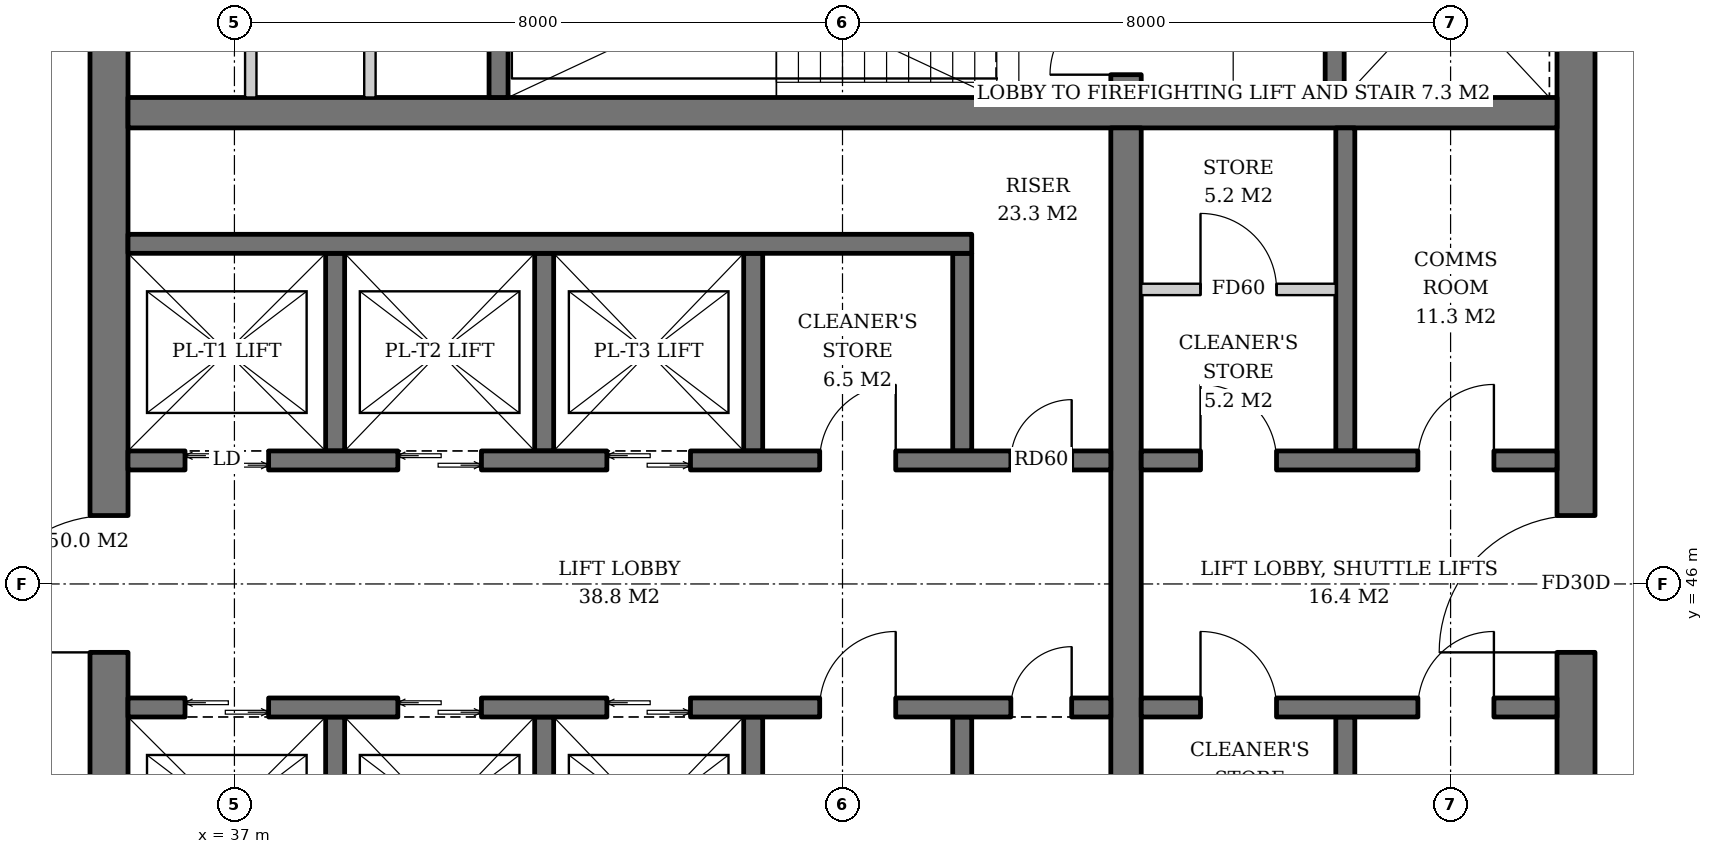
"""IFC4 building model, lengths in metres.
Left out: names, types, materials, properties, quantities, classifications, styles, units other than length and angle.
Written with IfcOpenShell. Run it as: python <this file> out.ifc"""

import sys

from ifc_helpers import new_model, si_unit, direction, frame, frame_2d, origin, place, context, subcontext, project, spatial, rectangle, extrude, element, fill, save


model = new_model("IFC4")
c1 = context("Model", 3, precision=1e-05, world=origin(), true_north=direction((0.0, 1.0)))
c2 = subcontext(c1, "Body", "Model", "MODEL_VIEW")
j1 = project(units=[si_unit("LENGTHUNIT", "METRE"), si_unit("PLANEANGLEUNIT", "RADIAN")], contexts=[c1])
p1 = place(None, origin())
s1 = spatial("IfcSite", under=j1, at=p1, CompositionType="ELEMENT")
p2 = place(p1, origin())
s2 = spatial("IfcBuilding", under=s1, at=p2, CompositionType="ELEMENT")
p3 = place(p2, frame((0.0, 0.0, 279.4)))
s3 = spatial("IfcBuildingStorey", under=s2, at=p3, CompositionType="ELEMENT", Elevation=279.4)
p4 = place(p3, frame((35.35, 36.6, 0.0), z_axis=(0.0, 0.0, 1.0), x_axis=(0.0, 1.0, 0.0)))
e1 = element("IfcWall", 1, at=p4, inside=s3, PredefinedType="SHEAR", context=c2, shape_type="SweptSolid", body=[
    extrude(rectangle(XDim=18.8, YDim=0.5, at=frame_2d((9.4, 0.0))), origin(), (0.0, 0.0, 1.0), 3.8),
])
p5 = place(p4, frame((8.5, 0.0, 0.0)))
e2 = element("IfcOpeningElement", 2, at=p5, cuts=e1, PredefinedType="OPENING", context=c2, shape_type="SweptSolid", body=[
    extrude(rectangle(XDim=1.8, YDim=2.4, at=frame_2d((0.9, 1.2))), frame((0.0, 0.26, 0.0), z_axis=(0.0, -1.0, 0.0), x_axis=(1.0, 0.0, 0.0)), (0.0, 0.0, 1.0), 0.52),
])
p6 = place(p3, frame((54.65, 36.6, 0.0), z_axis=(0.0, 0.0, 1.0), x_axis=(0.0, 1.0, 0.0)))
e3 = element("IfcWall", 3, at=p6, inside=s3, PredefinedType="SHEAR", context=c2, shape_type="SweptSolid", body=[
    extrude(rectangle(XDim=18.8, YDim=0.5, at=frame_2d((9.4, 0.0))), origin(), (0.0, 0.0, 1.0), 3.8),
])
p7 = place(p6, frame((8.5, 0.0, 0.0)))
e4 = element("IfcOpeningElement", 4, at=p7, cuts=e3, PredefinedType="OPENING", context=c2, shape_type="SweptSolid", body=[
    extrude(rectangle(XDim=1.8, YDim=2.4, at=frame_2d((0.9, 1.2))), frame((0.0, 0.26, 0.0), z_axis=(0.0, -1.0, 0.0), x_axis=(1.0, 0.0, 0.0)), (0.0, 0.0, 1.0), 0.52),
])
p8 = place(p3, frame((35.6, 52.2, 0.0), z_axis=(0.0, 0.0, 1.0), x_axis=(1.0, 0.0, 0.0)))
e5 = element("IfcWall", 5, at=p8, inside=s3, PredefinedType="SHEAR", context=c2, shape_type="SweptSolid", body=[
    extrude(rectangle(XDim=18.8, YDim=0.4, at=frame_2d((9.4, 0.0))), origin(), (0.0, 0.0, 1.0), 3.8),
])
p9 = place(p3, frame((48.73, 40.0, 0.0), z_axis=(0.0, 0.0, 1.0), x_axis=(0.0, 1.0, 0.0)))
e6 = element("IfcWall", 6, at=p9, inside=s3, PredefinedType="SHEAR", context=c2, shape_type="SweptSolid", body=[
    extrude(rectangle(XDim=12.0, YDim=0.4, at=frame_2d((6.0, 0.0))), origin(), (0.0, 0.0, 1.0), 3.8),
])
p10 = place(p3, frame((48.73, 52.4, 0.0), z_axis=(0.0, 0.0, 1.0), x_axis=(0.0, 1.0, 0.0)))
e7 = element("IfcWall", 7, at=p10, inside=s3, PredefinedType="SHEAR", context=c2, shape_type="SweptSolid", body=[
    extrude(rectangle(XDim=3.0, YDim=0.4, at=frame_2d((1.5, 0.0))), origin(), (0.0, 0.0, 1.0), 3.8),
])
p11 = place(p10, frame((0.3, 0.0, 0.0)))
e8 = element("IfcOpeningElement", 8, at=p11, cuts=e7, PredefinedType="OPENING", context=c2, shape_type="SweptSolid", body=[
    extrude(rectangle(XDim=1.0, YDim=2.1, at=frame_2d((0.5, 1.05))), frame((0.0, 0.21, 0.0), z_axis=(0.0, -1.0, 0.0), x_axis=(1.0, 0.0, 0.0)), (0.0, 0.0, 1.0), 0.42),
])
p12 = place(p3, frame((40.475, 52.4, 0.0), z_axis=(0.0, 0.0, 1.0), x_axis=(0.0, 1.0, 0.0)))
e9 = element("IfcWall", 9, at=p12, inside=s3, PredefinedType="SHEAR", context=c2, shape_type="SweptSolid", body=[
    extrude(rectangle(XDim=3.0, YDim=0.25, at=frame_2d((1.5, 0.0))), origin(), (0.0, 0.0, 1.0), 3.8),
])
p13 = place(p3, frame((51.475, 52.4, 0.0), z_axis=(0.0, 0.0, 1.0), x_axis=(0.0, 1.0, 0.0)))
e10 = element("IfcWall", 10, at=p13, inside=s3, PredefinedType="SHEAR", context=c2, shape_type="SweptSolid", body=[
    extrude(rectangle(XDim=3.0, YDim=0.25, at=frame_2d((1.5, 0.0))), origin(), (0.0, 0.0, 1.0), 3.8),
])
p14 = place(p13, frame((0.8, 0.0, 0.0)))
e11 = element("IfcOpeningElement", 11, at=p14, cuts=e10, PredefinedType="OPENING", context=c2, shape_type="SweptSolid", body=[
    extrude(rectangle(XDim=1.3, YDim=2.2, at=frame_2d((0.65, 1.1))), frame((0.0, 0.135, 0.0), z_axis=(0.0, -1.0, 0.0), x_axis=(1.0, 0.0, 0.0)), (0.0, 0.0, 1.0), 0.27),
])
for number, where, z_axis, x_axis in (
    (12, (38.325, 47.75, 0.0), (0.0, 0.0, 1.0), (0.0, 1.0, 0.0)),
    (13, (41.075, 47.75, 0.0), (0.0, 0.0, 1.0), (0.0, 1.0, 0.0)),
    (14, (43.825, 47.75, 0.0), (0.0, 0.0, 1.0), (0.0, 1.0, 0.0)),
    (15, (46.575, 47.75, 0.0), (0.0, 0.0, 1.0), (0.0, 1.0, 0.0)),
):
    element("IfcWall", number, at=place(p3, frame(where, z_axis=z_axis, x_axis=x_axis)), inside=s3, PredefinedType="SHEAR", context=c2, shape_type="SweptSolid", body=[
        extrude(rectangle(XDim=2.6, YDim=0.25, at=frame_2d((1.3, 0.0))), origin(), (0.0, 0.0, 1.0), 3.8),
    ])
p15 = place(p3, frame((35.6, 50.475, 0.0), z_axis=(0.0, 0.0, 1.0), x_axis=(1.0, 0.0, 0.0)))
e16 = element("IfcWall", 16, at=p15, inside=s3, PredefinedType="SHEAR", context=c2, shape_type="SweptSolid", body=[
    extrude(rectangle(XDim=11.1, YDim=0.25, at=frame_2d((5.55, 0.0))), origin(), (0.0, 0.0, 1.0), 3.8),
])
p16 = place(p3, frame((35.6, 47.625, 0.0), z_axis=(0.0, 0.0, 1.0), x_axis=(1.0, 0.0, 0.0)))
e17 = element("IfcWall", 17, at=p16, inside=s3, PredefinedType="SHEAR", context=c2, shape_type="SweptSolid", body=[
    extrude(rectangle(XDim=12.93, YDim=0.25, at=frame_2d((6.465, 0.0))), origin(), (0.0, 0.0, 1.0), 3.8),
])
p17 = place(p16, frame((0.75, 0.0, 0.0)))
e18 = element("IfcOpeningElement", 18, at=p17, cuts=e17, PredefinedType="OPENING", context=c2, shape_type="SweptSolid", body=[
    extrude(rectangle(XDim=1.1, YDim=2.2, at=frame_2d((0.55, 1.1))), frame((0.0, 0.135, 0.0), z_axis=(0.0, -1.0, 0.0), x_axis=(1.0, 0.0, 0.0)), (0.0, 0.0, 1.0), 0.27),
])
p18 = place(p16, frame((3.55, 0.0, 0.0)))
e19 = element("IfcOpeningElement", 19, at=p18, cuts=e17, PredefinedType="OPENING", context=c2, shape_type="SweptSolid", body=[
    extrude(rectangle(XDim=1.1, YDim=2.2, at=frame_2d((0.55, 1.1))), frame((0.0, 0.135, 0.0), z_axis=(0.0, -1.0, 0.0), x_axis=(1.0, 0.0, 0.0)), (0.0, 0.0, 1.0), 0.27),
])
p19 = place(p16, frame((6.3, 0.0, 0.0)))
e20 = element("IfcOpeningElement", 20, at=p19, cuts=e17, PredefinedType="OPENING", context=c2, shape_type="SweptSolid", body=[
    extrude(rectangle(XDim=1.1, YDim=2.2, at=frame_2d((0.55, 1.1))), frame((0.0, 0.135, 0.0), z_axis=(0.0, -1.0, 0.0), x_axis=(1.0, 0.0, 0.0)), (0.0, 0.0, 1.0), 0.27),
])
p20 = place(p16, frame((9.1, 0.0, 0.0)))
e21 = element("IfcOpeningElement", 21, at=p20, cuts=e17, PredefinedType="OPENING", context=c2, shape_type="SweptSolid", body=[
    extrude(rectangle(XDim=1.0, YDim=2.1, at=frame_2d((0.5, 1.05))), frame((0.0, 0.135, 0.0), z_axis=(0.0, -1.0, 0.0), x_axis=(1.0, 0.0, 0.0)), (0.0, 0.0, 1.0), 0.27),
])
p21 = place(p16, frame((11.615, 0.0, 0.0)))
e22 = element("IfcOpeningElement", 22, at=p21, cuts=e17, PredefinedType="OPENING", context=c2, shape_type="SweptSolid", body=[
    extrude(rectangle(XDim=0.8, YDim=2.0, at=frame_2d((0.4, 1.0))), frame((0.0, 0.135, 0.0), z_axis=(0.0, -1.0, 0.0), x_axis=(1.0, 0.0, 0.0)), (0.0, 0.0, 1.0), 0.27),
])
for number, where, z_axis, x_axis in (
    (23, (38.325, 44.25, 0.0), (0.0, 0.0, 1.0), (0.0, -1.0, 0.0)),
    (24, (41.075, 44.25, 0.0), (0.0, 0.0, 1.0), (0.0, -1.0, 0.0)),
    (25, (43.825, 44.25, 0.0), (0.0, 0.0, 1.0), (0.0, -1.0, 0.0)),
    (26, (46.575, 44.25, 0.0), (0.0, 0.0, 1.0), (0.0, -1.0, 0.0)),
):
    element("IfcWall", number, at=place(p3, frame(where, z_axis=z_axis, x_axis=x_axis)), inside=s3, PredefinedType="SHEAR", context=c2, shape_type="SweptSolid", body=[
        extrude(rectangle(XDim=2.6, YDim=0.25, at=frame_2d((1.3, 0.0))), origin(), (0.0, 0.0, 1.0), 3.8),
    ])
p22 = place(p3, frame((35.6, 44.375, 0.0), z_axis=(0.0, 0.0, 1.0), x_axis=(1.0, 0.0, 0.0)))
e27 = element("IfcWall", 27, at=p22, inside=s3, PredefinedType="SHEAR", context=c2, shape_type="SweptSolid", body=[
    extrude(rectangle(XDim=12.93, YDim=0.25, at=frame_2d((6.465, 0.0))), origin(), (0.0, 0.0, 1.0), 3.8),
])
p23 = place(p22, frame((0.75, 0.0, 0.0)))
e28 = element("IfcOpeningElement", 28, at=p23, cuts=e27, PredefinedType="OPENING", context=c2, shape_type="SweptSolid", body=[
    extrude(rectangle(XDim=1.1, YDim=2.2, at=frame_2d((0.55, 1.1))), frame((0.0, 0.135, 0.0), z_axis=(0.0, -1.0, 0.0), x_axis=(1.0, 0.0, 0.0)), (0.0, 0.0, 1.0), 0.27),
])
p24 = place(p22, frame((3.55, 0.0, 0.0)))
e29 = element("IfcOpeningElement", 29, at=p24, cuts=e27, PredefinedType="OPENING", context=c2, shape_type="SweptSolid", body=[
    extrude(rectangle(XDim=1.1, YDim=2.2, at=frame_2d((0.55, 1.1))), frame((0.0, 0.135, 0.0), z_axis=(0.0, -1.0, 0.0), x_axis=(1.0, 0.0, 0.0)), (0.0, 0.0, 1.0), 0.27),
])
p25 = place(p22, frame((6.3, 0.0, 0.0)))
e30 = element("IfcOpeningElement", 30, at=p25, cuts=e27, PredefinedType="OPENING", context=c2, shape_type="SweptSolid", body=[
    extrude(rectangle(XDim=1.1, YDim=2.2, at=frame_2d((0.55, 1.1))), frame((0.0, 0.135, 0.0), z_axis=(0.0, -1.0, 0.0), x_axis=(1.0, 0.0, 0.0)), (0.0, 0.0, 1.0), 0.27),
])
p26 = place(p22, frame((9.1, 0.0, 0.0)))
e31 = element("IfcOpeningElement", 31, at=p26, cuts=e27, PredefinedType="OPENING", context=c2, shape_type="SweptSolid", body=[
    extrude(rectangle(XDim=1.0, YDim=2.1, at=frame_2d((0.5, 1.05))), frame((0.0, 0.135, 0.0), z_axis=(0.0, -1.0, 0.0), x_axis=(1.0, 0.0, 0.0)), (0.0, 0.0, 1.0), 0.27),
])
p27 = place(p22, frame((11.615, 0.0, 0.0)))
e32 = element("IfcOpeningElement", 32, at=p27, cuts=e27, PredefinedType="OPENING", context=c2, shape_type="SweptSolid", body=[
    extrude(rectangle(XDim=0.8, YDim=2.0, at=frame_2d((0.4, 1.0))), frame((0.0, 0.135, 0.0), z_axis=(0.0, -1.0, 0.0), x_axis=(1.0, 0.0, 0.0)), (0.0, 0.0, 1.0), 0.27),
])
p28 = place(p3, frame((51.615, 47.75, 0.0), z_axis=(0.0, 0.0, 1.0), x_axis=(0.0, 1.0, 0.0)))
e33 = element("IfcWall", 33, at=p28, inside=s3, PredefinedType="SHEAR", context=c2, shape_type="SweptSolid", body=[
    extrude(rectangle(XDim=4.25, YDim=0.25, at=frame_2d((2.125, 0.0))), origin(), (0.0, 0.0, 1.0), 3.8),
])
p29 = place(p3, frame((48.93, 47.625, 0.0), z_axis=(0.0, 0.0, 1.0), x_axis=(1.0, 0.0, 0.0)))
e34 = element("IfcWall", 34, at=p29, inside=s3, PredefinedType="SHEAR", context=c2, shape_type="SweptSolid", body=[
    extrude(rectangle(XDim=5.47, YDim=0.25, at=frame_2d((2.735, 0.0))), origin(), (0.0, 0.0, 1.0), 3.8),
])
p30 = place(p29, frame((0.78, 0.0, 0.0)))
e35 = element("IfcOpeningElement", 35, at=p30, cuts=e34, PredefinedType="OPENING", context=c2, shape_type="SweptSolid", body=[
    extrude(rectangle(XDim=1.0, YDim=2.1, at=frame_2d((0.5, 1.05))), frame((0.0, 0.135, 0.0), z_axis=(0.0, -1.0, 0.0), x_axis=(1.0, 0.0, 0.0)), (0.0, 0.0, 1.0), 0.27),
])
p31 = place(p29, frame((3.64, 0.0, 0.0)))
e36 = element("IfcOpeningElement", 36, at=p31, cuts=e34, PredefinedType="OPENING", context=c2, shape_type="SweptSolid", body=[
    extrude(rectangle(XDim=1.0, YDim=2.1, at=frame_2d((0.5, 1.05))), frame((0.0, 0.135, 0.0), z_axis=(0.0, -1.0, 0.0), x_axis=(1.0, 0.0, 0.0)), (0.0, 0.0, 1.0), 0.27),
])
p32 = place(p3, frame((51.615, 44.25, 0.0), z_axis=(0.0, 0.0, 1.0), x_axis=(0.0, -1.0, 0.0)))
e37 = element("IfcWall", 37, at=p32, inside=s3, PredefinedType="SHEAR", context=c2, shape_type="SweptSolid", body=[
    extrude(rectangle(XDim=4.25, YDim=0.25, at=frame_2d((2.125, 0.0))), origin(), (0.0, 0.0, 1.0), 3.8),
])
p33 = place(p3, frame((48.93, 44.375, 0.0), z_axis=(0.0, 0.0, 1.0), x_axis=(1.0, 0.0, 0.0)))
e38 = element("IfcWall", 38, at=p33, inside=s3, PredefinedType="SHEAR", context=c2, shape_type="SweptSolid", body=[
    extrude(rectangle(XDim=5.47, YDim=0.25, at=frame_2d((2.735, 0.0))), origin(), (0.0, 0.0, 1.0), 3.8),
])
p34 = place(p33, frame((0.78, 0.0, 0.0)))
e39 = element("IfcOpeningElement", 39, at=p34, cuts=e38, PredefinedType="OPENING", context=c2, shape_type="SweptSolid", body=[
    extrude(rectangle(XDim=1.0, YDim=2.1, at=frame_2d((0.5, 1.05))), frame((0.0, 0.135, 0.0), z_axis=(0.0, -1.0, 0.0), x_axis=(1.0, 0.0, 0.0)), (0.0, 0.0, 1.0), 0.27),
])
p35 = place(p33, frame((3.64, 0.0, 0.0)))
e40 = element("IfcOpeningElement", 40, at=p35, cuts=e38, PredefinedType="OPENING", context=c2, shape_type="SweptSolid", body=[
    extrude(rectangle(XDim=1.0, YDim=2.1, at=frame_2d((0.5, 1.05))), frame((0.0, 0.135, 0.0), z_axis=(0.0, -1.0, 0.0), x_axis=(1.0, 0.0, 0.0)), (0.0, 0.0, 1.0), 0.27),
])
for number, where, z_axis, x_axis in (
    (41, (37.215, 52.4, 0.0), (0.0, 0.0, 1.0), (0.0, 1.0, 0.0)),
    (42, (38.782, 52.4, 0.0), (0.0, 0.0, 1.0), (0.0, 1.0, 0.0)),
):
    element("IfcWall", number, at=place(p3, frame(where, z_axis=z_axis, x_axis=x_axis)), inside=s3, PredefinedType="SOLIDWALL", context=c2, shape_type="SweptSolid", body=[
        extrude(rectangle(XDim=3.0, YDim=0.15, at=frame_2d((1.5, 0.0))), origin(), (0.0, 0.0, 1.0), 3.5),
    ])
p36 = place(p3, frame((48.93, 49.875, 0.0), z_axis=(0.0, 0.0, 1.0), x_axis=(1.0, 0.0, 0.0)))
e43 = element("IfcWall", 43, at=p36, inside=s3, PredefinedType="SOLIDWALL", context=c2, shape_type="SweptSolid", body=[
    extrude(rectangle(XDim=2.56, YDim=0.15, at=frame_2d((1.28, 0.0))), origin(), (0.0, 0.0, 1.0), 3.5),
])
p37 = place(p36, frame((0.78, 0.0, 0.0)))
e44 = element("IfcOpeningElement", 44, at=p37, cuts=e43, PredefinedType="OPENING", context=c2, shape_type="SweptSolid", body=[
    extrude(rectangle(XDim=1.0, YDim=2.1, at=frame_2d((0.5, 1.05))), frame((0.0, 0.085, 0.0), z_axis=(0.0, -1.0, 0.0), x_axis=(1.0, 0.0, 0.0)), (0.0, 0.0, 1.0), 0.17),
])
p38 = place(p17, origin())
e45 = element("IfcDoor", 45, at=p38, inside=s3, OperationType="DOUBLE_DOOR_SLIDING", PredefinedType="DOOR", context=c2, shape_type="SweptSolid", body=[
    extrude(rectangle(XDim=1.1, YDim=2.2, at=frame_2d((0.55, 1.1))), frame((0.0, 0.025, 0.0), z_axis=(0.0, -1.0, 0.0), x_axis=(1.0, 0.0, 0.0)), (0.0, 0.0, 1.0), 0.05),
])
fill(e18, e45)
p39 = place(p18, origin())
e46 = element("IfcDoor", 46, at=p39, inside=s3, OperationType="DOUBLE_DOOR_SLIDING", PredefinedType="DOOR", context=c2, shape_type="SweptSolid", body=[
    extrude(rectangle(XDim=1.1, YDim=2.2, at=frame_2d((0.55, 1.1))), frame((0.0, 0.025, 0.0), z_axis=(0.0, -1.0, 0.0), x_axis=(1.0, 0.0, 0.0)), (0.0, 0.0, 1.0), 0.05),
])
fill(e19, e46)
p40 = place(p19, origin())
e47 = element("IfcDoor", 47, at=p40, inside=s3, OperationType="DOUBLE_DOOR_SLIDING", PredefinedType="DOOR", context=c2, shape_type="SweptSolid", body=[
    extrude(rectangle(XDim=1.1, YDim=2.2, at=frame_2d((0.55, 1.1))), frame((0.0, 0.025, 0.0), z_axis=(0.0, -1.0, 0.0), x_axis=(1.0, 0.0, 0.0)), (0.0, 0.0, 1.0), 0.05),
])
fill(e20, e47)
p41 = place(p20, origin())
e48 = element("IfcDoor", 48, at=p41, inside=s3, OperationType="SINGLE_SWING_RIGHT", PredefinedType="DOOR", context=c2, shape_type="SweptSolid", body=[
    extrude(rectangle(XDim=1.0, YDim=2.1, at=frame_2d((0.5, 1.05))), frame((0.0, 0.025, 0.0), z_axis=(0.0, -1.0, 0.0), x_axis=(1.0, 0.0, 0.0)), (0.0, 0.0, 1.0), 0.05),
])
fill(e21, e48)
p42 = place(p21, origin())
e49 = element("IfcDoor", 49, at=p42, inside=s3, OperationType="SINGLE_SWING_RIGHT", PredefinedType="DOOR", context=c2, shape_type="SweptSolid", body=[
    extrude(rectangle(XDim=0.8, YDim=2.0, at=frame_2d((0.4, 1.0))), frame((0.0, 0.025, 0.0), z_axis=(0.0, -1.0, 0.0), x_axis=(1.0, 0.0, 0.0)), (0.0, 0.0, 1.0), 0.05),
])
fill(e22, e49)
p43 = place(p23, origin())
e50 = element("IfcDoor", 50, at=p43, inside=s3, OperationType="DOUBLE_DOOR_SLIDING", PredefinedType="DOOR", context=c2, shape_type="SweptSolid", body=[
    extrude(rectangle(XDim=1.1, YDim=2.2, at=frame_2d((0.55, 1.1))), frame((0.0, 0.025, 0.0), z_axis=(0.0, -1.0, 0.0), x_axis=(1.0, 0.0, 0.0)), (0.0, 0.0, 1.0), 0.05),
])
fill(e28, e50)
p44 = place(p24, origin())
e51 = element("IfcDoor", 51, at=p44, inside=s3, OperationType="DOUBLE_DOOR_SLIDING", PredefinedType="DOOR", context=c2, shape_type="SweptSolid", body=[
    extrude(rectangle(XDim=1.1, YDim=2.2, at=frame_2d((0.55, 1.1))), frame((0.0, 0.025, 0.0), z_axis=(0.0, -1.0, 0.0), x_axis=(1.0, 0.0, 0.0)), (0.0, 0.0, 1.0), 0.05),
])
fill(e29, e51)
p45 = place(p25, origin())
e52 = element("IfcDoor", 52, at=p45, inside=s3, OperationType="DOUBLE_DOOR_SLIDING", PredefinedType="DOOR", context=c2, shape_type="SweptSolid", body=[
    extrude(rectangle(XDim=1.1, YDim=2.2, at=frame_2d((0.55, 1.1))), frame((0.0, 0.025, 0.0), z_axis=(0.0, -1.0, 0.0), x_axis=(1.0, 0.0, 0.0)), (0.0, 0.0, 1.0), 0.05),
])
fill(e30, e52)
p46 = place(p26, origin())
e53 = element("IfcDoor", 53, at=p46, inside=s3, OperationType="SINGLE_SWING_RIGHT", PredefinedType="DOOR", context=c2, shape_type="SweptSolid", body=[
    extrude(rectangle(XDim=1.0, YDim=2.1, at=frame_2d((0.5, 1.05))), frame((0.0, 0.025, 0.0), z_axis=(0.0, -1.0, 0.0), x_axis=(1.0, 0.0, 0.0)), (0.0, 0.0, 1.0), 0.05),
])
fill(e31, e53)
p47 = place(p27, origin())
e54 = element("IfcDoor", 54, at=p47, inside=s3, OperationType="SINGLE_SWING_RIGHT", PredefinedType="DOOR", context=c2, shape_type="SweptSolid", body=[
    extrude(rectangle(XDim=0.8, YDim=2.0, at=frame_2d((0.4, 1.0))), frame((0.0, 0.025, 0.0), z_axis=(0.0, -1.0, 0.0), x_axis=(1.0, 0.0, 0.0)), (0.0, 0.0, 1.0), 0.05),
])
fill(e32, e54)
p48 = place(p30, origin())
e55 = element("IfcDoor", 55, at=p48, inside=s3, OperationType="SINGLE_SWING_LEFT", PredefinedType="DOOR", context=c2, shape_type="SweptSolid", body=[
    extrude(rectangle(XDim=1.0, YDim=2.1, at=frame_2d((0.5, 1.05))), frame((0.0, 0.025, 0.0), z_axis=(0.0, -1.0, 0.0), x_axis=(1.0, 0.0, 0.0)), (0.0, 0.0, 1.0), 0.05),
])
fill(e35, e55)
p49 = place(p31, origin())
e56 = element("IfcDoor", 56, at=p49, inside=s3, OperationType="SINGLE_SWING_RIGHT", PredefinedType="DOOR", context=c2, shape_type="SweptSolid", body=[
    extrude(rectangle(XDim=1.0, YDim=2.1, at=frame_2d((0.5, 1.05))), frame((0.0, 0.025, 0.0), z_axis=(0.0, -1.0, 0.0), x_axis=(1.0, 0.0, 0.0)), (0.0, 0.0, 1.0), 0.05),
])
fill(e36, e56)
p50 = place(p34, origin())
e57 = element("IfcDoor", 57, at=p50, inside=s3, OperationType="SINGLE_SWING_LEFT", PredefinedType="DOOR", context=c2, shape_type="SweptSolid", body=[
    extrude(rectangle(XDim=1.0, YDim=2.1, at=frame_2d((0.5, 1.05))), frame((0.0, 0.025, 0.0), z_axis=(0.0, -1.0, 0.0), x_axis=(1.0, 0.0, 0.0)), (0.0, 0.0, 1.0), 0.05),
])
fill(e39, e57)
p51 = place(p35, origin())
e58 = element("IfcDoor", 58, at=p51, inside=s3, OperationType="SINGLE_SWING_RIGHT", PredefinedType="DOOR", context=c2, shape_type="SweptSolid", body=[
    extrude(rectangle(XDim=1.0, YDim=2.1, at=frame_2d((0.5, 1.05))), frame((0.0, 0.025, 0.0), z_axis=(0.0, -1.0, 0.0), x_axis=(1.0, 0.0, 0.0)), (0.0, 0.0, 1.0), 0.05),
])
fill(e40, e58)
p52 = place(p37, origin())
e59 = element("IfcDoor", 59, at=p52, inside=s3, OperationType="SINGLE_SWING_LEFT", PredefinedType="DOOR", context=c2, shape_type="SweptSolid", body=[
    extrude(rectangle(XDim=1.0, YDim=2.1, at=frame_2d((0.5, 1.05))), frame((0.0, 0.025, 0.0), z_axis=(0.0, -1.0, 0.0), x_axis=(1.0, 0.0, 0.0)), (0.0, 0.0, 1.0), 0.05),
])
fill(e44, e59)
p53 = place(p11, origin())
e60 = element("IfcDoor", 60, at=p53, inside=s3, OperationType="SINGLE_SWING_LEFT", PredefinedType="DOOR", context=c2, shape_type="SweptSolid", body=[
    extrude(rectangle(XDim=1.0, YDim=2.1, at=frame_2d((0.5, 1.05))), frame((0.0, 0.025, 0.0), z_axis=(0.0, -1.0, 0.0), x_axis=(1.0, 0.0, 0.0)), (0.0, 0.0, 1.0), 0.05),
])
fill(e8, e60)
p54 = place(p5, origin())
e61 = element("IfcDoor", 61, at=p54, inside=s3, OperationType="DOUBLE_DOOR_SINGLE_SWING", PredefinedType="DOOR", context=c2, shape_type="SweptSolid", body=[
    extrude(rectangle(XDim=1.8, YDim=2.4, at=frame_2d((0.9, 1.2))), frame((0.0, 0.025, 0.0), z_axis=(0.0, -1.0, 0.0), x_axis=(1.0, 0.0, 0.0)), (0.0, 0.0, 1.0), 0.05),
])
fill(e2, e61)
p55 = place(p7, origin())
e62 = element("IfcDoor", 62, at=p55, inside=s3, OperationType="DOUBLE_DOOR_SINGLE_SWING", PredefinedType="DOOR", context=c2, shape_type="SweptSolid", body=[
    extrude(rectangle(XDim=1.8, YDim=2.4, at=frame_2d((0.9, 1.2))), frame((0.0, 0.025, 0.0), z_axis=(0.0, -1.0, 0.0), x_axis=(1.0, 0.0, 0.0)), (0.0, 0.0, 1.0), 0.05),
])
fill(e4, e62)
save(model, sys.argv[1])
